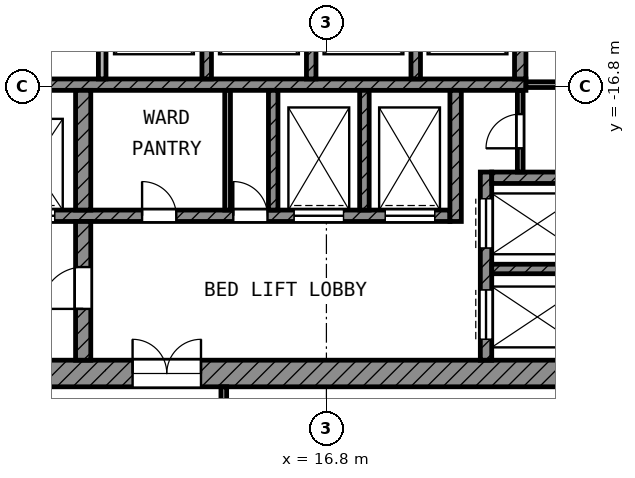
"""IFC4 building model, lengths in metres.
Left out: names, types, materials, properties, quantities, classifications, styles, units other than length and angle.
Written with IfcOpenShell. Run it as: python <this file> out.ifc"""

import sys

from ifc_helpers import new_model, si_unit, direction, frame, frame_2d, origin, place, context, subcontext, project, spatial, rectangle, extrude, element, fill, save


model = new_model("IFC4")
c1 = context("Model", 3, precision=1e-05, world=origin(), true_north=direction((0.0, 1.0)))
c2 = subcontext(c1, "Body", "Model", "MODEL_VIEW")
j1 = project(units=[si_unit("LENGTHUNIT", "METRE"), si_unit("PLANEANGLEUNIT", "RADIAN")], contexts=[c1])
p1 = place(None, origin())
s1 = spatial("IfcSite", under=j1, at=p1, CompositionType="ELEMENT")
p2 = place(p1, origin())
s2 = spatial("IfcBuilding", under=s1, at=p2, CompositionType="ELEMENT")
p3 = place(p2, frame((0.0, 0.0, 307.0)))
s3 = spatial("IfcBuildingStorey", under=s2, at=p3, CompositionType="ELEMENT", Elevation=307.0)
p4 = place(p3, frame((5.4, -24.35, 0.0), z_axis=(0.0, 0.0, 1.0), x_axis=(1.0, 0.0, 0.0)))
e1 = element("IfcWall", 1, at=p4, inside=s3, PredefinedType="SHEAR", context=c2, shape_type="SweptSolid", body=[
    extrude(rectangle(XDim=18.6, YDim=0.7, at=frame_2d((9.3, 0.0))), origin(), (0.0, 0.0, 1.0), 3.6),
])
p5 = place(p4, frame((6.3, 0.0, 0.0)))
e2 = element("IfcOpeningElement", 2, at=p5, cuts=e1, PredefinedType="OPENING", context=c2, shape_type="SweptSolid", body=[
    extrude(rectangle(XDim=1.8, YDim=2.1, at=frame_2d((0.9, 1.05))), frame((0.0, 0.36, 0.0), z_axis=(0.0, -1.0, 0.0), x_axis=(1.0, 0.0, 0.0)), (0.0, 0.0, 1.0), 0.72),
])
p6 = place(p3, frame((5.4, -16.75, 0.0), z_axis=(0.0, 0.0, 1.0), x_axis=(1.0, 0.0, 0.0)))
e3 = element("IfcWall", 3, at=p6, inside=s3, PredefinedType="SHEAR", context=c2, shape_type="SweptSolid", body=[
    extrude(rectangle(XDim=16.65, YDim=0.3, at=frame_2d((8.325, 0.0))), origin(), (0.0, 0.0, 1.0), 3.6),
])
p7 = place(p3, frame((5.4, -20.2, 0.0), z_axis=(0.0, 0.0, 1.0), x_axis=(1.0, 0.0, 0.0)))
e4 = element("IfcWall", 4, at=p7, inside=s3, PredefinedType="SHEAR", context=c2, shape_type="SweptSolid", body=[
    extrude(rectangle(XDim=14.65, YDim=0.3, at=frame_2d((7.325, 0.0))), origin(), (0.0, 0.0, 1.0), 3.6),
])
p8 = place(p7, frame((10.55, 0.0, 0.0)))
e5 = element("IfcOpeningElement", 5, at=p8, cuts=e4, PredefinedType="OPENING", context=c2, shape_type="SweptSolid", body=[
    extrude(rectangle(XDim=1.3, YDim=2.1, at=frame_2d((0.65, 1.05))), frame((0.0, 0.16, 0.0), z_axis=(0.0, -1.0, 0.0), x_axis=(1.0, 0.0, 0.0)), (0.0, 0.0, 1.0), 0.32),
])
p9 = place(p7, frame((12.95, 0.0, 0.0)))
e6 = element("IfcOpeningElement", 6, at=p9, cuts=e4, PredefinedType="OPENING", context=c2, shape_type="SweptSolid", body=[
    extrude(rectangle(XDim=1.3, YDim=2.1, at=frame_2d((0.65, 1.05))), frame((0.0, 0.16, 0.0), z_axis=(0.0, -1.0, 0.0), x_axis=(1.0, 0.0, 0.0)), (0.0, 0.0, 1.0), 0.32),
])
p10 = place(p7, frame((0.55, 0.0, 0.0)))
e7 = element("IfcOpeningElement", 7, at=p10, cuts=e4, PredefinedType="OPENING", context=c2, shape_type="SweptSolid", body=[
    extrude(rectangle(XDim=1.3, YDim=2.1, at=frame_2d((0.65, 1.05))), frame((0.0, 0.16, 0.0), z_axis=(0.0, -1.0, 0.0), x_axis=(1.0, 0.0, 0.0)), (0.0, 0.0, 1.0), 0.32),
])
p11 = place(p7, frame((2.95, 0.0, 0.0)))
e8 = element("IfcOpeningElement", 8, at=p11, cuts=e4, PredefinedType="OPENING", context=c2, shape_type="SweptSolid", body=[
    extrude(rectangle(XDim=1.3, YDim=2.1, at=frame_2d((0.65, 1.05))), frame((0.0, 0.16, 0.0), z_axis=(0.0, -1.0, 0.0), x_axis=(1.0, 0.0, 0.0)), (0.0, 0.0, 1.0), 0.32),
])
p12 = place(p7, frame((6.55, 0.0, 0.0)))
e9 = element("IfcOpeningElement", 9, at=p12, cuts=e4, PredefinedType="OPENING", context=c2, shape_type="SweptSolid", body=[
    extrude(rectangle(XDim=0.9, YDim=2.1, at=frame_2d((0.45, 1.05))), frame((0.0, 0.16, 0.0), z_axis=(0.0, -1.0, 0.0), x_axis=(1.0, 0.0, 0.0)), (0.0, 0.0, 1.0), 0.32),
])
p13 = place(p7, frame((8.95, 0.0, 0.0)))
e10 = element("IfcOpeningElement", 10, at=p13, cuts=e4, PredefinedType="OPENING", context=c2, shape_type="SweptSolid", body=[
    extrude(rectangle(XDim=0.9, YDim=2.1, at=frame_2d((0.45, 1.05))), frame((0.0, 0.16, 0.0), z_axis=(0.0, -1.0, 0.0), x_axis=(1.0, 0.0, 0.0)), (0.0, 0.0, 1.0), 0.32),
])
p14 = place(p3, frame((10.4, -24.0, 0.0), z_axis=(0.0, 0.0, 1.0), x_axis=(0.0, 1.0, 0.0)))
e11 = element("IfcWall", 11, at=p14, inside=s3, PredefinedType="SHEAR", context=c2, shape_type="SweptSolid", body=[
    extrude(rectangle(XDim=3.65, YDim=0.4, at=frame_2d((1.825, 0.0))), origin(), (0.0, 0.0, 1.0), 3.6),
])
p15 = place(p14, frame((1.35, 0.0, 0.0)))
e12 = element("IfcOpeningElement", 12, at=p15, cuts=e11, PredefinedType="OPENING", context=c2, shape_type="SweptSolid", body=[
    extrude(rectangle(XDim=1.1, YDim=2.1, at=frame_2d((0.55, 1.05))), frame((0.0, 0.21, 0.0), z_axis=(0.0, -1.0, 0.0), x_axis=(1.0, 0.0, 0.0)), (0.0, 0.0, 1.0), 0.42),
])
p16 = place(p3, frame((10.4, -20.05, 0.0), z_axis=(0.0, 0.0, 1.0), x_axis=(0.0, 1.0, 0.0)))
e13 = element("IfcWall", 13, at=p16, inside=s3, PredefinedType="SHEAR", context=c2, shape_type="SweptSolid", body=[
    extrude(rectangle(XDim=3.15, YDim=0.4, at=frame_2d((1.575, 0.0))), origin(), (0.0, 0.0, 1.0), 3.6),
])
p17 = place(p3, frame((20.2, -20.35, 0.0), z_axis=(0.0, 0.0, 1.0), x_axis=(0.0, 1.0, 0.0)))
e14 = element("IfcWall", 14, at=p17, inside=s3, PredefinedType="SHEAR", context=c2, shape_type="SweptSolid", body=[
    extrude(rectangle(XDim=3.45, YDim=0.3, at=frame_2d((1.725, 0.0))), origin(), (0.0, 0.0, 1.0), 3.6),
])
p18 = place(p3, frame((21.9, -16.6, 0.0), z_axis=(0.0, 0.0, 1.0), x_axis=(0.0, 1.0, 0.0)))
e15 = element("IfcWall", 15, at=p18, inside=s3, PredefinedType="SHEAR", context=c2, shape_type="SweptSolid", body=[
    extrude(rectangle(XDim=2.35, YDim=0.3, at=frame_2d((1.175, 0.0))), origin(), (0.0, 0.0, 1.0), 3.6),
])
p19 = place(p3, frame((21.15, -19.2, 0.0), z_axis=(0.0, 0.0, 1.0), x_axis=(1.0, 0.0, 0.0)))
e16 = element("IfcWall", 16, at=p19, inside=s3, PredefinedType="SHEAR", context=c2, shape_type="SweptSolid", body=[
    extrude(rectangle(XDim=2.85, YDim=0.3, at=frame_2d((1.425, 0.0))), origin(), (0.0, 0.0, 1.0), 3.6),
])
p20 = place(p3, frame((21.0, -24.0, 0.0), z_axis=(0.0, 0.0, 1.0), x_axis=(0.0, 1.0, 0.0)))
e17 = element("IfcWall", 17, at=p20, inside=s3, PredefinedType="SHEAR", context=c2, shape_type="SweptSolid", body=[
    extrude(rectangle(XDim=4.95, YDim=0.3, at=frame_2d((2.475, 0.0))), origin(), (0.0, 0.0, 1.0), 3.6),
])
p21 = place(p20, frame((2.95, 0.0, 0.0)))
e18 = element("IfcOpeningElement", 18, at=p21, cuts=e17, PredefinedType="OPENING", context=c2, shape_type="SweptSolid", body=[
    extrude(rectangle(XDim=1.3, YDim=2.1, at=frame_2d((0.65, 1.05))), frame((0.0, 0.16, 0.0), z_axis=(0.0, -1.0, 0.0), x_axis=(1.0, 0.0, 0.0)), (0.0, 0.0, 1.0), 0.32),
])
p22 = place(p20, frame((0.55, 0.0, 0.0)))
e19 = element("IfcOpeningElement", 19, at=p22, cuts=e17, PredefinedType="OPENING", context=c2, shape_type="SweptSolid", body=[
    extrude(rectangle(XDim=1.3, YDim=2.1, at=frame_2d((0.65, 1.05))), frame((0.0, 0.16, 0.0), z_axis=(0.0, -1.0, 0.0), x_axis=(1.0, 0.0, 0.0)), (0.0, 0.0, 1.0), 0.32),
])
p23 = place(p3, frame((21.15, -21.6, 0.0), z_axis=(0.0, 0.0, 1.0), x_axis=(1.0, 0.0, 0.0)))
e20 = element("IfcWall", 20, at=p23, inside=s3, PredefinedType="SHEAR", context=c2, shape_type="SweptSolid", body=[
    extrude(rectangle(XDim=2.85, YDim=0.25, at=frame_2d((1.425, 0.0))), origin(), (0.0, 0.0, 1.0), 3.6),
])
for number, where, z_axis, x_axis in (
    (21, (15.4, -20.05, 0.0), (0.0, 0.0, 1.0), (0.0, 1.0, 0.0)),
    (22, (17.8, -20.05, 0.0), (0.0, 0.0, 1.0), (0.0, 1.0, 0.0)),
):
    element("IfcWall", number, at=place(p3, frame(where, z_axis=z_axis, x_axis=x_axis)), inside=s3, PredefinedType="SHEAR", context=c2, shape_type="SweptSolid", body=[
        extrude(rectangle(XDim=3.15, YDim=0.25, at=frame_2d((1.575, 0.0))), origin(), (0.0, 0.0, 1.0), 3.6),
    ])
p24 = place(p3, frame((10.9, -16.6, 0.0), z_axis=(0.0, 0.0, 1.0), x_axis=(0.0, 1.0, 0.0)))
e23 = element("IfcWall", 23, at=p24, inside=s3, PredefinedType="PARTITIONING", context=c2, shape_type="SweptSolid", body=[
    extrude(rectangle(XDim=2.35, YDim=0.2, at=frame_2d((1.175, 0.0))), origin(), (0.0, 0.0, 1.0), 3.6),
])
for number, where, z_axis, x_axis in (
    (24, (13.65, -16.6, 0.0), (0.0, 0.0, 1.0), (0.0, 1.0, 0.0)),
    (25, (16.4, -16.6, 0.0), (0.0, 0.0, 1.0), (0.0, 1.0, 0.0)),
    (26, (19.15, -16.6, 0.0), (0.0, 0.0, 1.0), (0.0, 1.0, 0.0)),
):
    element("IfcWall", number, at=place(p3, frame(where, z_axis=z_axis, x_axis=x_axis)), inside=s3, PredefinedType="SHEAR", context=c2, shape_type="SweptSolid", body=[
        extrude(rectangle(XDim=2.35, YDim=0.25, at=frame_2d((1.175, 0.0))), origin(), (0.0, 0.0, 1.0), 3.6),
    ])
p25 = place(p3, frame((21.9, -19.05, 0.0), z_axis=(0.0, 0.0, 1.0), x_axis=(0.0, 1.0, 0.0)))
e27 = element("IfcWall", 27, at=p25, inside=s3, PredefinedType="PARTITIONING", context=c2, shape_type="SweptSolid", body=[
    extrude(rectangle(XDim=2.15, YDim=0.15, at=frame_2d((1.075, 0.0))), origin(), (0.0, 0.0, 1.0), 3.6),
])
p26 = place(p25, frame((0.625, 0.0, 0.0)))
e28 = element("IfcOpeningElement", 28, at=p26, cuts=e27, PredefinedType="OPENING", context=c2, shape_type="SweptSolid", body=[
    extrude(rectangle(XDim=0.9, YDim=2.1, at=frame_2d((0.45, 1.05))), frame((0.0, 0.085, 0.0), z_axis=(0.0, -1.0, 0.0), x_axis=(1.0, 0.0, 0.0)), (0.0, 0.0, 1.0), 0.17),
])
p27 = place(p3, frame((22.05, -16.75, 0.0), z_axis=(0.0, 0.0, 1.0), x_axis=(1.0, 0.0, 0.0)))
e29 = element("IfcWall", 29, at=p27, inside=s3, PredefinedType="PARTITIONING", context=c2, shape_type="SweptSolid", body=[
    extrude(rectangle(XDim=1.95, YDim=0.15, at=frame_2d((0.975, 0.0))), origin(), (0.0, 0.0, 1.0), 3.6),
])
p28 = place(p3, frame((14.2, -20.05, 0.0), z_axis=(0.0, 0.0, 1.0), x_axis=(0.0, 1.0, 0.0)))
e30 = element("IfcWall", 30, at=p28, inside=s3, PredefinedType="PARTITIONING", context=c2, shape_type="SweptSolid", body=[
    extrude(rectangle(XDim=3.15, YDim=0.15, at=frame_2d((1.575, 0.0))), origin(), (0.0, 0.0, 1.0), 3.6),
])
p29 = place(p3, frame((14.1, -29.325, 0.0), z_axis=(0.0, 0.0, 1.0), x_axis=(0.0, 1.0, 0.0)))
e31 = element("IfcWall", 31, at=p29, inside=s3, PredefinedType="PARTITIONING", context=c2, shape_type="SweptSolid", body=[
    extrude(rectangle(XDim=4.625, YDim=0.15, at=frame_2d((2.312, 0.0))), origin(), (0.0, 0.0, 1.0), 3.6),
])
p30 = place(p21, origin())
e32 = element("IfcDoor", 32, at=p30, inside=s3, OperationType="DOUBLE_DOOR_SLIDING", PredefinedType="DOOR", context=c2, shape_type="SweptSolid", body=[
    extrude(rectangle(XDim=1.3, YDim=2.1, at=frame_2d((0.65, 1.05))), frame((0.0, 0.025, 0.0), z_axis=(0.0, -1.0, 0.0), x_axis=(1.0, 0.0, 0.0)), (0.0, 0.0, 1.0), 0.05),
])
fill(e18, e32)
p31 = place(p22, origin())
e33 = element("IfcDoor", 33, at=p31, inside=s3, OperationType="DOUBLE_DOOR_SLIDING", PredefinedType="DOOR", context=c2, shape_type="SweptSolid", body=[
    extrude(rectangle(XDim=1.3, YDim=2.1, at=frame_2d((0.65, 1.05))), frame((0.0, 0.025, 0.0), z_axis=(0.0, -1.0, 0.0), x_axis=(1.0, 0.0, 0.0)), (0.0, 0.0, 1.0), 0.05),
])
fill(e19, e33)
p32 = place(p8, origin())
e34 = element("IfcDoor", 34, at=p32, inside=s3, OperationType="DOUBLE_DOOR_SLIDING", PredefinedType="DOOR", context=c2, shape_type="SweptSolid", body=[
    extrude(rectangle(XDim=1.3, YDim=2.1, at=frame_2d((0.65, 1.05))), frame((0.0, 0.025, 0.0), z_axis=(0.0, -1.0, 0.0), x_axis=(1.0, 0.0, 0.0)), (0.0, 0.0, 1.0), 0.05),
])
fill(e5, e34)
p33 = place(p9, origin())
e35 = element("IfcDoor", 35, at=p33, inside=s3, OperationType="DOUBLE_DOOR_SLIDING", PredefinedType="DOOR", context=c2, shape_type="SweptSolid", body=[
    extrude(rectangle(XDim=1.3, YDim=2.1, at=frame_2d((0.65, 1.05))), frame((0.0, 0.025, 0.0), z_axis=(0.0, -1.0, 0.0), x_axis=(1.0, 0.0, 0.0)), (0.0, 0.0, 1.0), 0.05),
])
fill(e6, e35)
p34 = place(p11, origin())
e36 = element("IfcDoor", 36, at=p34, inside=s3, OperationType="DOUBLE_DOOR_SLIDING", PredefinedType="DOOR", context=c2, shape_type="SweptSolid", body=[
    extrude(rectangle(XDim=1.3, YDim=2.1, at=frame_2d((0.65, 1.05))), frame((0.0, 0.025, 0.0), z_axis=(0.0, -1.0, 0.0), x_axis=(1.0, 0.0, 0.0)), (0.0, 0.0, 1.0), 0.05),
])
fill(e8, e36)
p35 = place(p15, origin())
e37 = element("IfcDoor", 37, at=p35, inside=s3, OperationType="SINGLE_SWING_LEFT", PredefinedType="DOOR", context=c2, shape_type="SweptSolid", body=[
    extrude(rectangle(XDim=1.1, YDim=2.1, at=frame_2d((0.55, 1.05))), frame((0.0, 0.025, 0.0), z_axis=(0.0, -1.0, 0.0), x_axis=(1.0, 0.0, 0.0)), (0.0, 0.0, 1.0), 0.05),
])
fill(e12, e37)
p36 = place(p5, origin())
e38 = element("IfcDoor", 38, at=p36, inside=s3, OperationType="DOUBLE_DOOR_SINGLE_SWING", PredefinedType="DOOR", context=c2, shape_type="SweptSolid", body=[
    extrude(rectangle(XDim=1.8, YDim=2.1, at=frame_2d((0.9, 1.05))), frame((0.0, 0.025, 0.0), z_axis=(0.0, -1.0, 0.0), x_axis=(1.0, 0.0, 0.0)), (0.0, 0.0, 1.0), 0.05),
])
fill(e2, e38)
p37 = place(p26, origin())
e39 = element("IfcDoor", 39, at=p37, inside=s3, OperationType="SINGLE_SWING_LEFT", PredefinedType="DOOR", context=c2, shape_type="SweptSolid", body=[
    extrude(rectangle(XDim=0.9, YDim=2.1, at=frame_2d((0.45, 1.05))), frame((0.0, 0.025, 0.0), z_axis=(0.0, -1.0, 0.0), x_axis=(1.0, 0.0, 0.0)), (0.0, 0.0, 1.0), 0.05),
])
fill(e28, e39)
p38 = place(p12, origin())
e40 = element("IfcDoor", 40, at=p38, inside=s3, OperationType="SINGLE_SWING_LEFT", PredefinedType="DOOR", context=c2, shape_type="SweptSolid", body=[
    extrude(rectangle(XDim=0.9, YDim=2.1, at=frame_2d((0.45, 1.05))), frame((0.0, 0.025, 0.0), z_axis=(0.0, -1.0, 0.0), x_axis=(1.0, 0.0, 0.0)), (0.0, 0.0, 1.0), 0.05),
])
fill(e9, e40)
p39 = place(p13, origin())
e41 = element("IfcDoor", 41, at=p39, inside=s3, OperationType="SINGLE_SWING_LEFT", PredefinedType="DOOR", context=c2, shape_type="SweptSolid", body=[
    extrude(rectangle(XDim=0.9, YDim=2.1, at=frame_2d((0.45, 1.05))), frame((0.0, 0.025, 0.0), z_axis=(0.0, -1.0, 0.0), x_axis=(1.0, 0.0, 0.0)), (0.0, 0.0, 1.0), 0.05),
])
fill(e10, e41)
save(model, sys.argv[1])
